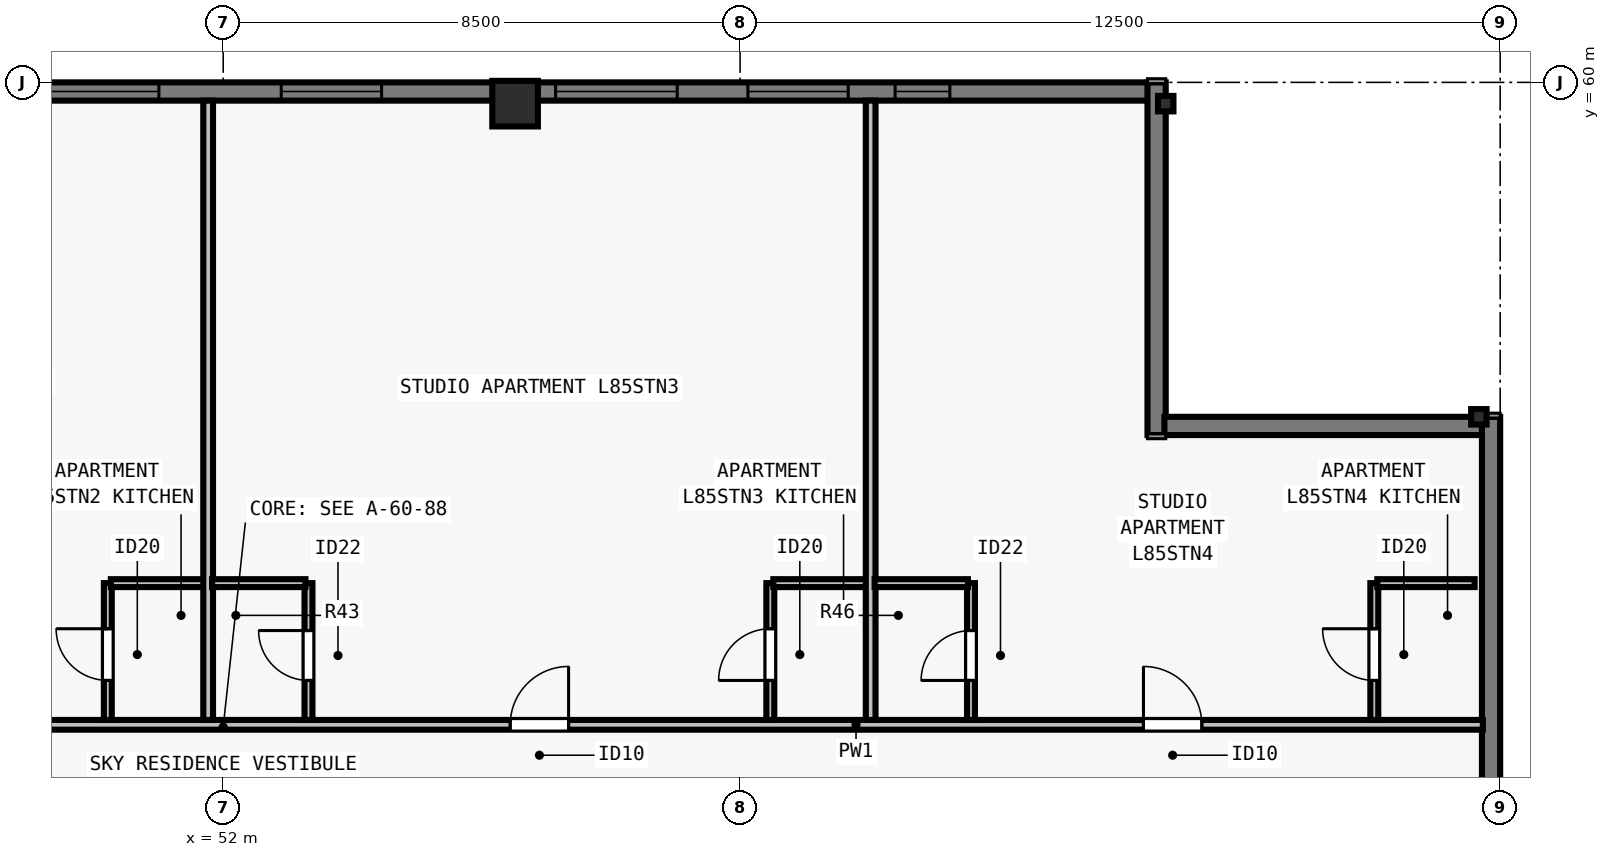
"""IFC4 building model, lengths in metres.
Left out: names, types, materials, properties, quantities, classifications, styles, units other than length and angle.
Written with IfcOpenShell. Run it as: python <this file> out.ifc"""

import sys

from ifc_helpers import new_model, si_unit, direction, frame, frame_2d, origin, origin_2d, place, context, subcontext, project, spatial, rectangle, i_section, extrude, element, fill, save


model = new_model("IFC4")
c1 = context("Model", 3, precision=1e-05, world=origin(), true_north=direction((0.0, 1.0)))
c2 = subcontext(c1, "Body", "Model", "MODEL_VIEW")
j1 = project(units=[si_unit("LENGTHUNIT", "METRE"), si_unit("PLANEANGLEUNIT", "RADIAN")], contexts=[c1])
p1 = place(None, origin())
s1 = spatial("IfcSite", under=j1, at=p1, CompositionType="ELEMENT")
p2 = place(p1, origin())
s2 = spatial("IfcBuilding", under=s1, at=p2, CompositionType="ELEMENT")
p3 = place(p2, frame((0.0, 0.0, 308.5)))
s3 = spatial("IfcBuildingStorey", under=s2, at=p3, CompositionType="ELEMENT", Elevation=308.5)
for number, where, z_axis, x_axis in (
    (1, (72.65, 54.5, 0.0), (0.0, 0.0, 1.0), (0.0, 1.0, 0.0)),
    (2, (67.5, 59.65, 0.0), (0.0, 0.0, 1.0), (1.0, 0.0, 0.0)),
):
    element("IfcColumn", number, at=place(p3, frame(where, z_axis=z_axis, x_axis=x_axis)), inside=s3, PredefinedType="COLUMN", context=c2, shape_type="SweptSolid", body=[
        extrude(i_section(OverallWidth=0.254, OverallDepth=0.254, WebThickness=0.009, FlangeThickness=0.014, FilletRadius=0.013, at=origin_2d()), origin(), (0.0, 0.0, 1.0), 3.5),
    ])
p4 = place(p3, frame((56.8, 59.65, 0.0), z_axis=(0.0, 0.0, 1.0), x_axis=(1.0, 0.0, 0.0)))
e3 = element("IfcColumn", 3, at=p4, inside=s3, PredefinedType="COLUMN", context=c2, shape_type="SweptSolid", body=[
    extrude(rectangle(XDim=0.75, YDim=0.75, at=origin_2d()), origin(), (0.0, 0.0, 1.0), 3.5),
])
p5 = place(p3, frame((36.5, 59.85, 0.0), z_axis=(0.0, 0.0, 1.0), x_axis=(1.0, 0.0, 0.0)))
e4 = element("IfcWall", 4, at=p5, inside=s3, PredefinedType="SOLIDWALL", context=c2, shape_type="SweptSolid", body=[
    extrude(rectangle(XDim=30.722, YDim=0.3, at=frame_2d((15.361, 0.0))), origin(), (0.0, 0.0, 1.0), 3.29),
])
p6 = place(p5, frame((6.019, 0.0, 0.8)))
e5 = element("IfcOpeningElement", 5, at=p6, cuts=e4, PredefinedType="OPENING", context=c2, shape_type="SweptSolid", body=[
    extrude(rectangle(XDim=2.0, YDim=1.758, at=frame_2d((1.0, 0.879))), frame((0.0, 0.16, 0.0), z_axis=(0.0, -1.0, 0.0), x_axis=(1.0, 0.0, 0.0)), (0.0, 0.0, 1.0), 0.32),
])
p7 = place(p5, frame((8.331, 0.0, 0.8)))
e6 = element("IfcOpeningElement", 6, at=p7, cuts=e4, PredefinedType="OPENING", context=c2, shape_type="SweptSolid", body=[
    extrude(rectangle(XDim=1.65, YDim=1.758, at=frame_2d((0.825, 0.879))), frame((0.0, 0.16, 0.0), z_axis=(0.0, -1.0, 0.0), x_axis=(1.0, 0.0, 0.0)), (0.0, 0.0, 1.0), 0.32),
])
p8 = place(p5, frame((12.442, 0.0, 0.8)))
e7 = element("IfcOpeningElement", 7, at=p8, cuts=e4, PredefinedType="OPENING", context=c2, shape_type="SweptSolid", body=[
    extrude(rectangle(XDim=2.0, YDim=1.758, at=frame_2d((1.0, 0.879))), frame((0.0, 0.16, 0.0), z_axis=(0.0, -1.0, 0.0), x_axis=(1.0, 0.0, 0.0)), (0.0, 0.0, 1.0), 0.32),
])
p9 = place(p5, frame((16.455, 0.0, 0.8)))
e8 = element("IfcOpeningElement", 8, at=p9, cuts=e4, PredefinedType="OPENING", context=c2, shape_type="SweptSolid", body=[
    extrude(rectangle(XDim=1.65, YDim=1.758, at=frame_2d((0.825, 0.879))), frame((0.0, 0.16, 0.0), z_axis=(0.0, -1.0, 0.0), x_axis=(1.0, 0.0, 0.0)), (0.0, 0.0, 1.0), 0.32),
])
p10 = place(p5, frame((20.967, 0.0, 0.8)))
e9 = element("IfcOpeningElement", 9, at=p10, cuts=e4, PredefinedType="OPENING", context=c2, shape_type="SweptSolid", body=[
    extrude(rectangle(XDim=2.0, YDim=1.758, at=frame_2d((1.0, 0.879))), frame((0.0, 0.16, 0.0), z_axis=(0.0, -1.0, 0.0), x_axis=(1.0, 0.0, 0.0)), (0.0, 0.0, 1.0), 0.32),
])
p11 = place(p5, frame((24.128, 0.0, 0.8)))
e10 = element("IfcOpeningElement", 10, at=p11, cuts=e4, PredefinedType="OPENING", context=c2, shape_type="SweptSolid", body=[
    extrude(rectangle(XDim=1.65, YDim=1.758, at=frame_2d((0.825, 0.879))), frame((0.0, 0.16, 0.0), z_axis=(0.0, -1.0, 0.0), x_axis=(1.0, 0.0, 0.0)), (0.0, 0.0, 1.0), 0.32),
])
p12 = place(p5, frame((26.55, 0.0, 0.8)))
e11 = element("IfcOpeningElement", 11, at=p12, cuts=e4, PredefinedType="OPENING", context=c2, shape_type="SweptSolid", body=[
    extrude(rectangle(XDim=0.9, YDim=1.75, at=frame_2d((0.45, 0.875))), frame((0.0, 0.16, 0.0), z_axis=(0.0, -1.0, 0.0), x_axis=(1.0, 0.0, 0.0)), (0.0, 0.0, 1.0), 0.32),
])
p13 = place(p3, frame((67.35, 60.0, 0.0), z_axis=(0.0, 0.0, 1.0), x_axis=(0.0, -1.0, 0.0)))
e12 = element("IfcWall", 12, at=p13, inside=s3, PredefinedType="SOLIDWALL", context=c2, shape_type="SweptSolid", body=[
    extrude(rectangle(XDim=5.8, YDim=0.3, at=frame_2d((2.9, 0.0))), origin(), (0.0, 0.0, 1.0), 3.29),
])
p14 = place(p3, frame((67.478, 54.35, 0.0), z_axis=(0.0, 0.0, 1.0), x_axis=(1.0, 0.0, 0.0)))
e13 = element("IfcWall", 13, at=p14, inside=s3, PredefinedType="SOLIDWALL", context=c2, shape_type="SweptSolid", body=[
    extrude(rectangle(XDim=5.244, YDim=0.3, at=frame_2d((2.622, 0.0))), origin(), (0.0, 0.0, 1.0), 3.29),
])
p15 = place(p3, frame((72.85, 54.5, 0.0), z_axis=(0.0, 0.0, 1.0), x_axis=(0.0, -1.0, 0.0)))
e14 = element("IfcWall", 14, at=p15, inside=s3, PredefinedType="SOLIDWALL", context=c2, shape_type="SweptSolid", body=[
    extrude(rectangle(XDim=11.022, YDim=0.3, at=frame_2d((5.511, 0.0))), origin(), (0.0, 0.0, 1.0), 3.29),
])
p16 = place(p15, frame((7.27, 0.0, 0.8)))
e15 = element("IfcOpeningElement", 15, at=p16, cuts=e14, PredefinedType="OPENING", context=c2, shape_type="SweptSolid", body=[
    extrude(rectangle(XDim=0.9, YDim=1.75, at=frame_2d((0.45, 0.875))), frame((0.0, 0.16, 0.0), z_axis=(0.0, -1.0, 0.0), x_axis=(1.0, 0.0, 0.0)), (0.0, 0.0, 1.0), 0.32),
])
p17 = place(p3, frame((31.285, 49.435, 0.0), z_axis=(0.0, 0.0, 1.0), x_axis=(1.0, 0.0, 0.0)))
e16 = element("IfcWall", 16, at=p17, inside=s3, PredefinedType="PARTITIONING", context=c2, shape_type="SweptSolid", body=[
    extrude(rectangle(XDim=41.43, YDim=0.16, at=frame_2d((20.715, 0.0))), origin(), (0.0, 0.0, 1.0), 3.009),
])
p18 = place(p17, frame((4.979, 0.0, 0.0)))
e17 = element("IfcOpeningElement", 17, at=p18, cuts=e16, PredefinedType="OPENING", context=c2, shape_type="SweptSolid", body=[
    extrude(rectangle(XDim=0.96, YDim=2.18, at=frame_2d((0.48, 1.09))), frame((0.0, 0.09, 0.0), z_axis=(0.0, -1.0, 0.0), x_axis=(1.0, 0.0, 0.0)), (0.0, 0.0, 1.0), 0.18),
])
p19 = place(p17, frame((15.145, 0.0, 0.0)))
e18 = element("IfcOpeningElement", 18, at=p19, cuts=e16, PredefinedType="OPENING", context=c2, shape_type="SweptSolid", body=[
    extrude(rectangle(XDim=0.96, YDim=2.18, at=frame_2d((0.48, 1.09))), frame((0.0, 0.09, 0.0), z_axis=(0.0, -1.0, 0.0), x_axis=(1.0, 0.0, 0.0)), (0.0, 0.0, 1.0), 0.18),
])
p20 = place(p17, frame((25.435, 0.0, 0.0)))
e19 = element("IfcOpeningElement", 19, at=p20, cuts=e16, PredefinedType="OPENING", context=c2, shape_type="SweptSolid", body=[
    extrude(rectangle(XDim=0.96, YDim=2.18, at=frame_2d((0.48, 1.09))), frame((0.0, 0.09, 0.0), z_axis=(0.0, -1.0, 0.0), x_axis=(1.0, 0.0, 0.0)), (0.0, 0.0, 1.0), 0.18),
])
p21 = place(p17, frame((35.849, 0.0, 0.0)))
e20 = element("IfcOpeningElement", 20, at=p21, cuts=e16, PredefinedType="OPENING", context=c2, shape_type="SweptSolid", body=[
    extrude(rectangle(XDim=0.96, YDim=2.18, at=frame_2d((0.48, 1.09))), frame((0.0, 0.09, 0.0), z_axis=(0.0, -1.0, 0.0), x_axis=(1.0, 0.0, 0.0)), (0.0, 0.0, 1.0), 0.18),
])
p22 = place(p3, frame((50.103, 49.515, 0.0), z_axis=(0.0, 0.0, 1.0), x_axis=(0.0, 1.0, 0.0)))
e21 = element("IfcWall", 21, at=p22, inside=s3, PredefinedType="PLUMBINGWALL", context=c2, shape_type="SweptSolid", body=[
    extrude(rectangle(XDim=2.25, YDim=0.13, at=frame_2d((1.125, 0.0))), origin(), (0.0, 0.0, 1.0), 3.009),
])
p23 = place(p22, frame((0.65, 0.0, 0.0)))
e22 = element("IfcOpeningElement", 22, at=p23, cuts=e21, PredefinedType="OPENING", context=c2, shape_type="SweptSolid", body=[
    extrude(rectangle(XDim=0.85, YDim=2.1, at=frame_2d((0.425, 1.05))), frame((0.0, 0.075, 0.0), z_axis=(0.0, -1.0, 0.0), x_axis=(1.0, 0.0, 0.0)), (0.0, 0.0, 1.0), 0.15),
])
p24 = place(p3, frame((50.153, 51.765, 0.0), z_axis=(0.0, 0.0, 1.0), x_axis=(1.0, 0.0, 0.0)))
e23 = element("IfcWall", 23, at=p24, inside=s3, PredefinedType="PLUMBINGWALL", context=c2, shape_type="SweptSolid", body=[
    extrude(rectangle(XDim=1.6, YDim=0.13, at=frame_2d((0.8, 0.0))), origin(), (0.0, 0.0, 1.0), 3.29),
])
p25 = place(p3, frame((51.752, 49.515, 0.0), z_axis=(0.0, 0.0, 1.0), x_axis=(0.0, 1.0, 0.0)))
e24 = element("IfcWall", 24, at=p25, inside=s3, PredefinedType="PARTITIONING", context=c2, shape_type="SweptSolid", body=[
    extrude(rectangle(XDim=10.185, YDim=0.16, at=frame_2d((5.093, 0.0))), origin(), (0.0, 0.0, 1.0), 3.009),
])
p26 = place(p3, frame((53.403, 49.515, 0.0), z_axis=(0.0, 0.0, 1.0), x_axis=(0.0, 1.0, 0.0)))
e25 = element("IfcWall", 25, at=p26, inside=s3, PredefinedType="PLUMBINGWALL", context=c2, shape_type="SweptSolid", body=[
    extrude(rectangle(XDim=2.25, YDim=0.13, at=frame_2d((1.125, 0.0))), origin(), (0.0, 0.0, 1.0), 3.29),
])
p27 = place(p26, frame((0.65, 0.0, 0.0)))
e26 = element("IfcOpeningElement", 26, at=p27, cuts=e25, PredefinedType="OPENING", context=c2, shape_type="SweptSolid", body=[
    extrude(rectangle(XDim=0.82, YDim=2.1, at=frame_2d((0.41, 1.05))), frame((0.0, 0.075, 0.0), z_axis=(0.0, -1.0, 0.0), x_axis=(1.0, 0.0, 0.0)), (0.0, 0.0, 1.0), 0.15),
])
p28 = place(p3, frame((51.817, 51.765, 0.0), z_axis=(0.0, 0.0, 1.0), x_axis=(1.0, 0.0, 0.0)))
e27 = element("IfcWall", 27, at=p28, inside=s3, PredefinedType="PLUMBINGWALL", context=c2, shape_type="SweptSolid", body=[
    extrude(rectangle(XDim=1.535, YDim=0.13, at=frame_2d((0.768, 0.0))), origin(), (0.0, 0.0, 1.0), 3.29),
])
p29 = place(p3, frame((60.998, 49.515, 0.0), z_axis=(0.0, 0.0, 1.0), x_axis=(0.0, 1.0, 0.0)))
e28 = element("IfcWall", 28, at=p29, inside=s3, PredefinedType="PLUMBINGWALL", context=c2, shape_type="SweptSolid", body=[
    extrude(rectangle(XDim=2.25, YDim=0.13, at=frame_2d((1.125, 0.0))), origin(), (0.0, 0.0, 1.0), 3.29),
])
p30 = place(p29, frame((0.65, 0.0, 0.0)))
e29 = element("IfcOpeningElement", 29, at=p30, cuts=e28, PredefinedType="OPENING", context=c2, shape_type="SweptSolid", body=[
    extrude(rectangle(XDim=0.85, YDim=2.1, at=frame_2d((0.425, 1.05))), frame((0.0, 0.075, 0.0), z_axis=(0.0, -1.0, 0.0), x_axis=(1.0, 0.0, 0.0)), (0.0, 0.0, 1.0), 0.15),
])
p31 = place(p3, frame((61.048, 51.765, 0.0), z_axis=(0.0, 0.0, 1.0), x_axis=(1.0, 0.0, 0.0)))
e30 = element("IfcWall", 30, at=p31, inside=s3, PredefinedType="PLUMBINGWALL", context=c2, shape_type="SweptSolid", body=[
    extrude(rectangle(XDim=1.6, YDim=0.13, at=frame_2d((0.8, 0.0))), origin(), (0.0, 0.0, 1.0), 3.29),
])
p32 = place(p3, frame((62.647, 49.515, 0.0), z_axis=(0.0, 0.0, 1.0), x_axis=(0.0, 1.0, 0.0)))
e31 = element("IfcWall", 31, at=p32, inside=s3, PredefinedType="PARTITIONING", context=c2, shape_type="SweptSolid", body=[
    extrude(rectangle(XDim=10.185, YDim=0.16, at=frame_2d((5.093, 0.0))), origin(), (0.0, 0.0, 1.0), 2.653),
])
p33 = place(p3, frame((64.298, 49.515, 0.0), z_axis=(0.0, 0.0, 1.0), x_axis=(0.0, 1.0, 0.0)))
e32 = element("IfcWall", 32, at=p33, inside=s3, PredefinedType="PLUMBINGWALL", context=c2, shape_type="SweptSolid", body=[
    extrude(rectangle(XDim=2.25, YDim=0.13, at=frame_2d((1.125, 0.0))), origin(), (0.0, 0.0, 1.0), 3.29),
])
p34 = place(p33, frame((0.65, 0.0, 0.0)))
e33 = element("IfcOpeningElement", 33, at=p34, cuts=e32, PredefinedType="OPENING", context=c2, shape_type="SweptSolid", body=[
    extrude(rectangle(XDim=0.82, YDim=2.1, at=frame_2d((0.41, 1.05))), frame((0.0, 0.075, 0.0), z_axis=(0.0, -1.0, 0.0), x_axis=(1.0, 0.0, 0.0)), (0.0, 0.0, 1.0), 0.15),
])
p35 = place(p3, frame((62.712, 51.765, 0.0), z_axis=(0.0, 0.0, 1.0), x_axis=(1.0, 0.0, 0.0)))
e34 = element("IfcWall", 34, at=p35, inside=s3, PredefinedType="PLUMBINGWALL", context=c2, shape_type="SweptSolid", body=[
    extrude(rectangle(XDim=1.535, YDim=0.13, at=frame_2d((0.768, 0.0))), origin(), (0.0, 0.0, 1.0), 3.29),
])
p36 = place(p3, frame((70.93, 49.515, 0.0), z_axis=(0.0, 0.0, 1.0), x_axis=(0.0, 1.0, 0.0)))
e35 = element("IfcWall", 35, at=p36, inside=s3, PredefinedType="PLUMBINGWALL", context=c2, shape_type="SweptSolid", body=[
    extrude(rectangle(XDim=2.25, YDim=0.13, at=frame_2d((1.125, 0.0))), origin(), (0.0, 0.0, 1.0), 3.29),
])
p37 = place(p36, frame((0.65, 0.0, 0.0)))
e36 = element("IfcOpeningElement", 36, at=p37, cuts=e35, PredefinedType="OPENING", context=c2, shape_type="SweptSolid", body=[
    extrude(rectangle(XDim=0.85, YDim=2.1, at=frame_2d((0.425, 1.05))), frame((0.0, 0.075, 0.0), z_axis=(0.0, -1.0, 0.0), x_axis=(1.0, 0.0, 0.0)), (0.0, 0.0, 1.0), 0.15),
])
p38 = place(p3, frame((70.98, 51.765, 0.0), z_axis=(0.0, 0.0, 1.0), x_axis=(1.0, 0.0, 0.0)))
e37 = element("IfcWall", 37, at=p38, inside=s3, PredefinedType="PLUMBINGWALL", context=c2, shape_type="SweptSolid", body=[
    extrude(rectangle(XDim=1.6, YDim=0.13, at=frame_2d((0.8, 0.0))), origin(), (0.0, 0.0, 1.0), 3.29),
])
p39 = place(p8, origin())
e38 = element("IfcWindow", 38, at=p39, inside=s3, PartitioningType="SINGLE_PANEL", PredefinedType="WINDOW", context=c2, shape_type="SweptSolid", body=[
    extrude(rectangle(XDim=2.0, YDim=1.758, at=frame_2d((1.0, 0.879))), frame((0.0, -0.05, 0.0), z_axis=(0.0, -1.0, 0.0), x_axis=(1.0, 0.0, 0.0)), (0.0, 0.0, 1.0), 0.06),
])
fill(e7, e38)
p40 = place(p9, origin())
e39 = element("IfcWindow", 39, at=p40, inside=s3, PartitioningType="SINGLE_PANEL", PredefinedType="WINDOW", context=c2, shape_type="SweptSolid", body=[
    extrude(rectangle(XDim=1.65, YDim=1.758, at=frame_2d((0.825, 0.879))), frame((0.0, -0.05, 0.0), z_axis=(0.0, -1.0, 0.0), x_axis=(1.0, 0.0, 0.0)), (0.0, 0.0, 1.0), 0.06),
])
fill(e8, e39)
p41 = place(p10, origin())
e40 = element("IfcWindow", 40, at=p41, inside=s3, PartitioningType="SINGLE_PANEL", PredefinedType="WINDOW", context=c2, shape_type="SweptSolid", body=[
    extrude(rectangle(XDim=2.0, YDim=1.758, at=frame_2d((1.0, 0.879))), frame((0.0, -0.05, 0.0), z_axis=(0.0, -1.0, 0.0), x_axis=(1.0, 0.0, 0.0)), (0.0, 0.0, 1.0), 0.06),
])
fill(e9, e40)
p42 = place(p11, origin())
e41 = element("IfcWindow", 41, at=p42, inside=s3, PartitioningType="SINGLE_PANEL", PredefinedType="WINDOW", context=c2, shape_type="SweptSolid", body=[
    extrude(rectangle(XDim=1.65, YDim=1.758, at=frame_2d((0.825, 0.879))), frame((0.0, -0.05, 0.0), z_axis=(0.0, -1.0, 0.0), x_axis=(1.0, 0.0, 0.0)), (0.0, 0.0, 1.0), 0.06),
])
fill(e10, e41)
p43 = place(p12, origin())
e42 = element("IfcWindow", 42, at=p43, inside=s3, PartitioningType="SINGLE_PANEL", PredefinedType="WINDOW", context=c2, shape_type="SweptSolid", body=[
    extrude(rectangle(XDim=0.9, YDim=1.75, at=frame_2d((0.45, 0.875))), frame((0.0, -0.04, 0.0), z_axis=(0.0, -1.0, 0.0), x_axis=(1.0, 0.0, 0.0)), (0.0, 0.0, 1.0), 0.06),
])
fill(e11, e42)
p44 = place(p23, origin())
e43 = element("IfcDoor", 43, at=p44, inside=s3, OperationType="SINGLE_SWING_RIGHT", PredefinedType="DOOR", context=c2, shape_type="SweptSolid", body=[
    extrude(rectangle(XDim=0.85, YDim=2.1, at=frame_2d((0.425, 1.05))), frame((0.0, 0.025, 0.0), z_axis=(0.0, -1.0, 0.0), x_axis=(1.0, 0.0, 0.0)), (0.0, 0.0, 1.0), 0.05),
])
fill(e22, e43)
p45 = place(p27, origin())
e44 = element("IfcDoor", 44, at=p45, inside=s3, OperationType="SINGLE_SWING_RIGHT", PredefinedType="DOOR", context=c2, shape_type="SweptSolid", body=[
    extrude(rectangle(XDim=0.82, YDim=2.1, at=frame_2d((0.41, 1.05))), frame((0.0, 0.025, 0.0), z_axis=(0.0, -1.0, 0.0), x_axis=(1.0, 0.0, 0.0)), (0.0, 0.0, 1.0), 0.05),
])
fill(e26, e44)
p46 = place(p30, origin())
e45 = element("IfcDoor", 45, at=p46, inside=s3, OperationType="SINGLE_SWING_LEFT", PredefinedType="DOOR", context=c2, shape_type="SweptSolid", body=[
    extrude(rectangle(XDim=0.85, YDim=2.1, at=frame_2d((0.425, 1.05))), frame((0.0, 0.025, 0.0), z_axis=(0.0, -1.0, 0.0), x_axis=(1.0, 0.0, 0.0)), (0.0, 0.0, 1.0), 0.05),
])
fill(e29, e45)
p47 = place(p20, origin())
e46 = element("IfcDoor", 46, at=p47, inside=s3, OperationType="SINGLE_SWING_RIGHT", PredefinedType="DOOR", context=c2, shape_type="SweptSolid", body=[
    extrude(rectangle(XDim=0.96, YDim=2.18, at=frame_2d((0.48, 1.09))), frame((0.0, 0.025, 0.0), z_axis=(0.0, -1.0, 0.0), x_axis=(1.0, 0.0, 0.0)), (0.0, 0.0, 1.0), 0.05),
])
fill(e19, e46)
p48 = place(p34, origin())
e47 = element("IfcDoor", 47, at=p48, inside=s3, OperationType="SINGLE_SWING_LEFT", PredefinedType="DOOR", context=c2, shape_type="SweptSolid", body=[
    extrude(rectangle(XDim=0.82, YDim=2.1, at=frame_2d((0.41, 1.05))), frame((0.0, 0.025, 0.0), z_axis=(0.0, -1.0, 0.0), x_axis=(1.0, 0.0, 0.0)), (0.0, 0.0, 1.0), 0.05),
])
fill(e33, e47)
p49 = place(p37, origin())
e48 = element("IfcDoor", 48, at=p49, inside=s3, OperationType="SINGLE_SWING_RIGHT", PredefinedType="DOOR", context=c2, shape_type="SweptSolid", body=[
    extrude(rectangle(XDim=0.85, YDim=2.1, at=frame_2d((0.425, 1.05))), frame((0.0, 0.025, 0.0), z_axis=(0.0, -1.0, 0.0), x_axis=(1.0, 0.0, 0.0)), (0.0, 0.0, 1.0), 0.05),
])
fill(e36, e48)
p50 = place(p21, origin())
e49 = element("IfcDoor", 49, at=p50, inside=s3, OperationType="SINGLE_SWING_LEFT", PredefinedType="DOOR", context=c2, shape_type="SweptSolid", body=[
    extrude(rectangle(XDim=0.96, YDim=2.18, at=frame_2d((0.48, 1.09))), frame((0.0, 0.025, 0.0), z_axis=(0.0, -1.0, 0.0), x_axis=(1.0, 0.0, 0.0)), (0.0, 0.0, 1.0), 0.05),
])
fill(e20, e49)
save(model, sys.argv[1])
